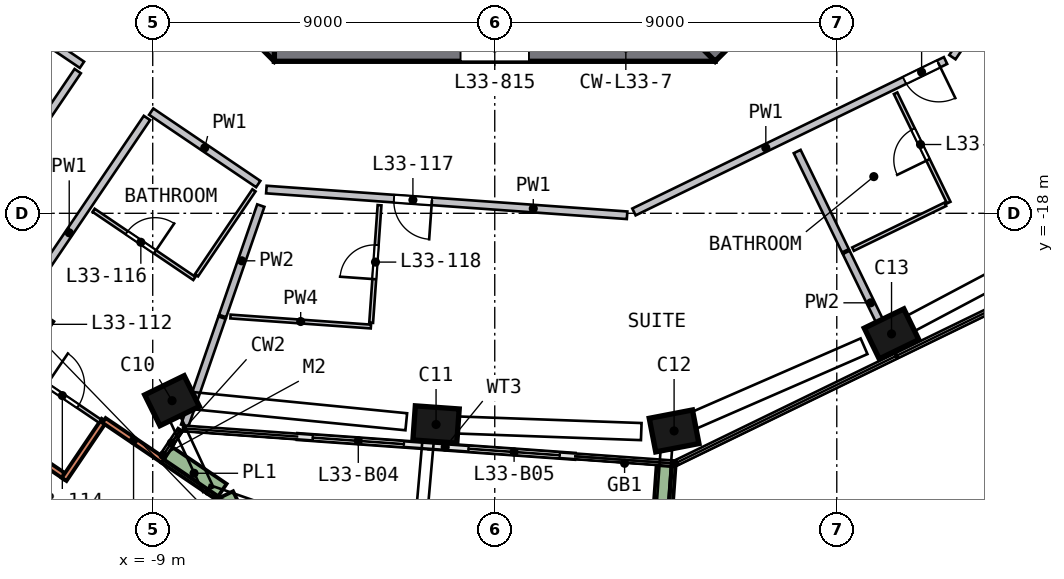
"""IFC4 building model, lengths in metres.
Left out: names, types, materials, properties, quantities, classifications, styles, units other than length and angle.
Written with IfcOpenShell. Run it as: python <this file> out.ifc"""

import sys

from ifc_helpers import new_model, si_unit, direction, frame, frame_2d, origin, origin_2d, place, context, subcontext, project, spatial, rectangle, extrude, element, fill, save


model = new_model("IFC4")
c1 = context("Model", 3, precision=1e-05, world=origin(), true_north=direction((0.0, 1.0)))
c2 = subcontext(c1, "Body", "Model", "MODEL_VIEW")
j1 = project(units=[si_unit("LENGTHUNIT", "METRE"), si_unit("PLANEANGLEUNIT", "RADIAN")], contexts=[c1])
p1 = place(None, origin())
s1 = spatial("IfcSite", under=j1, at=p1, CompositionType="ELEMENT")
p2 = place(p1, origin())
s2 = spatial("IfcBuilding", under=s1, at=p2, CompositionType="ELEMENT")
p3 = place(p2, frame((0.0, 0.0, 140.0)))
s3 = spatial("IfcBuildingStorey", under=s2, at=p3, CompositionType="ELEMENT", Elevation=140.0)
p4 = place(p3, frame((-8.623, -22.883, 0.0), z_axis=(0.109158074, -0.040060101, 0.993216846), x_axis=(-0.893388767, -0.442039795, 0.080357516)))
e1 = element("IfcColumn", 1, at=p4, inside=s3, PredefinedType="COLUMN", context=c2, shape_type="SweptSolid", body=[
    extrude(rectangle(XDim=1.15, YDim=0.9, at=origin_2d()), origin(), (0.0, 0.0, 1.0), 3.212),
])
p5 = place(p3, frame((-1.68, -23.549, 0.0), z_axis=(0.112098063, -0.006996623, 0.993672517), x_axis=(0.991182161, -0.070312823, -0.112312206)))
e2 = element("IfcColumn", 2, at=p5, inside=s3, PredefinedType="COLUMN", context=c2, shape_type="SweptSolid", body=[
    extrude(rectangle(XDim=1.15, YDim=0.9, at=origin_2d()), origin(), (0.0, 0.0, 1.0), 3.21),
])
p6 = place(p3, frame((4.583, -23.755, 0.0), z_axis=(0.112822514, 0.02273176, 0.993355096), x_axis=(-0.97541727, -0.187926686, 0.115085666)))
e3 = element("IfcColumn", 3, at=p6, inside=s3, PredefinedType="COLUMN", context=c2, shape_type="SweptSolid", body=[
    extrude(rectangle(XDim=1.15, YDim=0.9, at=origin_2d()), origin(), (0.0, 0.0, 1.0), 3.211),
])
p7 = place(p3, frame((10.32, -21.233, 0.0), z_axis=(0.100614614, 0.04988903, 0.993673882), x_axis=(0.893958315, 0.433851601, -0.11230013)))
e4 = element("IfcColumn", 4, at=p7, inside=s3, PredefinedType="COLUMN", context=c2, shape_type="SweptSolid", body=[
    extrude(rectangle(XDim=1.15, YDim=0.9, at=origin_2d()), origin(), (0.0, 0.0, 1.0), 3.21),
])
p8 = place(p3, frame((-12.392, -20.905, 0.0), z_axis=(0.099892281, -0.058156465, 0.993297215), x_axis=(-0.559990472, -0.828462229, 0.007810644)))
e5 = element("IfcColumn", 5, at=p8, inside=s3, PredefinedType="COLUMN", context=c2, shape_type="SweptSolid", body=[
    extrude(rectangle(XDim=0.9, YDim=0.9, at=origin_2d()), origin(), (0.0, 0.0, 1.0), 3.211),
])
p9 = place(p3, frame((-13.752, -5.552, 0.0), z_axis=(0.0, 0.0, 1.0), x_axis=(0.707106781, -0.707106781, 0.0)))
e6 = element("IfcWall", 6, at=p9, inside=s3, PredefinedType="SHEAR", context=c2, shape_type="SweptSolid", body=[
    extrude(rectangle(XDim=11.598, YDim=0.7, at=frame_2d((5.799, 0.0))), origin(), (0.0, 0.0, 1.0), 3.5),
])
p10 = place(p9, frame((2.099, 0.0, 0.0)))
e7 = element("IfcOpeningElement", 7, at=p10, cuts=e6, PredefinedType="OPENING", context=c2, shape_type="SweptSolid", body=[
    extrude(rectangle(XDim=1.2, YDim=2.1, at=frame_2d((0.6, 1.05))), frame((0.0, 0.36, 0.0), z_axis=(0.0, -1.0, 0.0), x_axis=(1.0, 0.0, 0.0)), (0.0, 0.0, 1.0), 0.72),
])
p11 = place(p3, frame((-5.799, -13.65, 0.0), z_axis=(0.0, 0.0, 1.0), x_axis=(1.0, 0.0, 0.0)))
e8 = element("IfcWall", 8, at=p11, inside=s3, PredefinedType="SHEAR", context=c2, shape_type="SweptSolid", body=[
    extrude(rectangle(XDim=11.598, YDim=0.7, at=frame_2d((5.799, 0.0))), origin(), (0.0, 0.0, 1.0), 3.5),
])
p12 = place(p11, frame((4.899, 0.0, 0.0)))
e9 = element("IfcOpeningElement", 9, at=p12, cuts=e8, PredefinedType="OPENING", context=c2, shape_type="SweptSolid", body=[
    extrude(rectangle(XDim=1.8, YDim=2.1, at=frame_2d((0.9, 1.05))), frame((0.0, 0.36, 0.0), z_axis=(0.0, -1.0, 0.0), x_axis=(1.0, 0.0, 0.0)), (0.0, 0.0, 1.0), 0.72),
])
p13 = place(p3, frame((5.552, -13.752, 0.0), z_axis=(0.0, 0.0, 1.0), x_axis=(0.707106781, 0.707106781, 0.0)))
e10 = element("IfcWall", 10, at=p13, inside=s3, PredefinedType="SHEAR", context=c2, shape_type="SweptSolid", body=[
    extrude(rectangle(XDim=11.598, YDim=0.7, at=frame_2d((5.799, 0.0))), origin(), (0.0, 0.0, 1.0), 3.5),
])
p14 = place(p13, frame((2.099, 0.0, 0.0)))
e11 = element("IfcOpeningElement", 11, at=p14, cuts=e10, PredefinedType="OPENING", context=c2, shape_type="SweptSolid", body=[
    extrude(rectangle(XDim=1.2, YDim=2.1, at=frame_2d((0.6, 1.05))), frame((0.0, 0.36, 0.0), z_axis=(0.0, -1.0, 0.0), x_axis=(1.0, 0.0, 0.0)), (0.0, 0.0, 1.0), 0.72),
])
p15 = place(p3, frame((-12.78, -23.932, 0.0), z_axis=(0.0, 0.0, 1.0), x_axis=(0.828296372, -0.56029021, 0.0)))
e12 = element("IfcWall", 12, at=p15, inside=s3, PredefinedType="SOLIDWALL", context=c2, shape_type="SweptSolid", body=[
    extrude(rectangle(XDim=1.8, YDim=0.15, at=frame_2d((0.9, 0.0))), origin(), (0.0, 0.0, 1.0), 3.19),
])
for number, where, z_axis, x_axis in (
    (13, (-11.332, -25.003, 0.0), (0.0, 0.0, 1.0), (0.56, 0.828, 0.0)),
    (14, (-10.281, -23.45, 0.0), (0.0, 0.0, 1.0), (0.828, -0.56, 0.0)),
):
    element("IfcWall", number, at=place(p3, frame(where, z_axis=z_axis, x_axis=x_axis)), inside=s3, PredefinedType="SOLIDWALL", context=c2, shape_type="SweptSolid", body=[
        extrude(rectangle(XDim=1.875, YDim=0.15, at=frame_2d((0.938, 0.0))), origin(), (0.0, 0.0, 1.0), 3.19),
    ])
p16 = place(p3, frame((-5.187, -23.875, 0.0), z_axis=(0.0, 0.0, 1.0), x_axis=(0.997464047, -0.071172155, 0.0)))
e15 = element("IfcWall", 15, at=p16, inside=s3, PredefinedType="SOLIDWALL", context=c2, shape_type="SweptSolid", body=[
    extrude(rectangle(XDim=3.475, YDim=0.15, at=frame_2d((1.737, 0.0))), origin(), (0.0, 0.0, 1.0), 2.475),
])
p17 = place(p16, frame((0.4, 0.0, 0.0)))
e16 = element("IfcOpeningElement", 16, at=p17, cuts=e15, PredefinedType="OPENING", context=c2, shape_type="SweptSolid", body=[
    extrude(rectangle(XDim=2.4, YDim=2.4, at=frame_2d((1.2, 1.2))), frame((0.0, 0.085, 0.0), z_axis=(0.0, -1.0, 0.0), x_axis=(1.0, 0.0, 0.0)), (0.0, 0.0, 1.0), 0.17),
])
p18 = place(p3, frame((-1.721, -24.122, 0.0), z_axis=(0.0, 0.0, 1.0), x_axis=(0.997464835, -0.071161106, 0.0)))
e17 = element("IfcWall", 17, at=p18, inside=s3, PredefinedType="SOLIDWALL", context=c2, shape_type="SweptSolid", body=[
    extrude(rectangle(XDim=3.836, YDim=0.15, at=frame_2d((1.918, 0.0))), origin(), (0.0, 0.0, 1.0), 2.475),
])
p19 = place(p18, frame((1.035, 0.0, 0.0)))
e18 = element("IfcOpeningElement", 18, at=p19, cuts=e17, PredefinedType="OPENING", context=c2, shape_type="SweptSolid", body=[
    extrude(rectangle(XDim=2.4, YDim=2.4, at=frame_2d((1.2, 1.2))), frame((0.0, 0.085, 0.0), z_axis=(0.0, -1.0, 0.0), x_axis=(1.0, 0.0, 0.0)), (0.0, 0.0, 1.0), 0.17),
])
p20 = place(p3, frame((-8.629, -24.356, 0.0), z_axis=(0.0, 0.0, 1.0), x_axis=(0.828277638, -0.560317905, 0.0)))
e19 = element("IfcWall", 19, at=p20, inside=s3, PredefinedType="SOLIDWALL", context=c2, shape_type="SweptSolid", body=[
    extrude(rectangle(XDim=1.731, YDim=0.5, at=frame_2d((0.866, 0.0))), origin(), (0.0, 0.0, 1.0), 0.7),
])
p21 = place(p3, frame((-7.11, -25.424, 0.0), z_axis=(0.0, 0.0, 1.0), x_axis=(0.437103717, -0.899411108, 0.0)))
e20 = element("IfcWall", 20, at=p21, inside=s3, PredefinedType="SOLIDWALL", context=c2, shape_type="SweptSolid", body=[
    extrude(rectangle(XDim=1.695, YDim=0.5, at=frame_2d((0.848, 0.0))), origin(), (0.0, 0.0, 1.0), 0.7),
])
p22 = place(p3, frame((4.316, -27.335, 0.0), z_axis=(0.0, 0.0, 1.0), x_axis=(0.071099196, 0.99746925, 0.0)))
e21 = element("IfcWall", 21, at=p22, inside=s3, PredefinedType="SOLIDWALL", context=c2, shape_type="SweptSolid", body=[
    extrude(rectangle(XDim=2.699, YDim=0.5, at=frame_2d((1.35, 0.0))), origin(), (0.0, 0.0, 1.0), 0.7),
])
p23 = place(p3, frame((-10.974, -14.258, 0.0), z_axis=(0.0, 0.0, 1.0), x_axis=(-0.56035998, -0.828249173, 0.0)))
e22 = element("IfcWall", 22, at=p23, inside=s3, PredefinedType="SOLIDWALL", context=c2, shape_type="SweptSolid", body=[
    extrude(rectangle(XDim=7.3, YDim=0.2, at=frame_2d((3.65, 0.0))), origin(), (0.0, 0.0, 1.0), 3.19),
])
p24 = place(p3, frame((-13.678, -12.187, 0.0), z_axis=(0.0, 0.0, 1.0), x_axis=(0.828263809, -0.560338347, 0.0)))
e23 = element("IfcWall", 23, at=p24, inside=s3, PredefinedType="SOLIDWALL", context=c2, shape_type="SweptSolid", body=[
    extrude(rectangle(XDim=3.4, YDim=0.2, at=frame_2d((1.7, 0.0))), origin(), (0.0, 0.0, 1.0), 3.19),
])
p25 = place(p3, frame((-13.242, -21.537, 0.0), z_axis=(0.0, 0.0, 1.0), x_axis=(0.56035998, 0.828249173, 0.0)))
e24 = element("IfcWall", 24, at=p25, inside=s3, PredefinedType="SOLIDWALL", context=c2, shape_type="SweptSolid", body=[
    extrude(rectangle(XDim=7.3, YDim=0.2, at=frame_2d((3.65, 0.0))), origin(), (0.0, 0.0, 1.0), 3.19),
])
p26 = place(p3, frame((-9.04, -15.325, 0.0), z_axis=(0.0, 0.0, 1.0), x_axis=(0.828253029, -0.560354281, 0.0)))
e25 = element("IfcWall", 25, at=p26, inside=s3, PredefinedType="SOLIDWALL", context=c2, shape_type="SweptSolid", body=[
    extrude(rectangle(XDim=3.4, YDim=0.2, at=frame_2d((1.7, 0.0))), origin(), (0.0, 0.0, 1.0), 3.19),
])
p27 = place(p3, frame((3.482, -18.052, 0.0), z_axis=(0.0, 0.0, 1.0), x_axis=(-0.997466118, 0.071143125, 0.0)))
e26 = element("IfcWall", 26, at=p27, inside=s3, PredefinedType="SOLIDWALL", context=c2, shape_type="SweptSolid", body=[
    extrude(rectangle(XDim=9.516, YDim=0.2, at=frame_2d((4.758, 0.0))), origin(), (0.0, 0.0, 1.0), 3.19),
])
p28 = place(p27, frame((5.15, 0.0, 0.0)))
e27 = element("IfcOpeningElement", 27, at=p28, cuts=e26, PredefinedType="OPENING", context=c2, shape_type="SweptSolid", body=[
    extrude(rectangle(XDim=1.0, YDim=2.1, at=frame_2d((0.5, 1.05))), frame((0.0, 0.11, 0.0), z_axis=(0.0, -1.0, 0.0), x_axis=(1.0, 0.0, 0.0)), (0.0, 0.0, 1.0), 0.22),
])
p29 = place(p3, frame((11.862, -13.98, 0.0), z_axis=(0.0, 0.0, 1.0), x_axis=(-0.899416115, -0.437093413, 0.0)))
e28 = element("IfcWall", 28, at=p29, inside=s3, PredefinedType="SOLIDWALL", context=c2, shape_type="SweptSolid", body=[
    extrude(rectangle(XDim=9.116, YDim=0.2, at=frame_2d((4.558, 0.0))), origin(), (0.0, 0.0, 1.0), 3.19),
])
p30 = place(p29, frame((0.2, 0.0, 0.0)))
e29 = element("IfcOpeningElement", 29, at=p30, cuts=e28, PredefinedType="OPENING", context=c2, shape_type="SweptSolid", body=[
    extrude(rectangle(XDim=1.0, YDim=2.1, at=frame_2d((0.5, 1.05))), frame((0.0, 0.11, 0.0), z_axis=(0.0, -1.0, 0.0), x_axis=(1.0, 0.0, 0.0)), (0.0, 0.0, 1.0), 0.22),
])
p31 = place(p3, frame((12.042, -13.892, 0.0), z_axis=(0.0, 0.0, 1.0), x_axis=(0.560341463, 0.828261701, 0.0)))
e30 = element("IfcWall", 30, at=p31, inside=s3, PredefinedType="SOLIDWALL", context=c2, shape_type="SweptSolid", body=[
    extrude(rectangle(XDim=9.516, YDim=0.2, at=frame_2d((4.758, 0.0))), origin(), (0.0, 0.0, 1.0), 3.19),
])
p32 = place(p3, frame((-7.176, -20.747, 0.0), z_axis=(0.0, 0.0, 1.0), x_axis=(-0.326885008, -0.94506412, 0.0)))
e31 = element("IfcWall", 31, at=p32, inside=s3, PredefinedType="SOLIDWALL", context=c2, shape_type="SweptSolid", body=[
    extrude(rectangle(XDim=3.011, YDim=0.2, at=frame_2d((1.506, 0.0))), origin(), (0.0, 0.0, 1.0), 3.19),
])
p33 = place(p3, frame((-6.156, -17.797, 0.0), z_axis=(0.0, 0.0, 1.0), x_axis=(-0.326832369, -0.945082326, 0.0)))
e32 = element("IfcWall", 32, at=p33, inside=s3, PredefinedType="SOLIDWALL", context=c2, shape_type="SweptSolid", body=[
    extrude(rectangle(XDim=3.075, YDim=0.2, at=frame_2d((1.537, 0.0))), origin(), (0.0, 0.0, 1.0), 3.19),
])
p34 = place(p3, frame((7.958, -16.374, 0.0), z_axis=(0.0, 0.0, 1.0), x_axis=(0.437133221, -0.899396769, 0.0)))
e33 = element("IfcWall", 33, at=p34, inside=s3, PredefinedType="SOLIDWALL", context=c2, shape_type="SweptSolid", body=[
    extrude(rectangle(XDim=2.905, YDim=0.2, at=frame_2d((1.452, 0.0))), origin(), (0.0, 0.0, 1.0), 3.19),
])
p35 = place(p3, frame((9.248, -19.028, 0.0), z_axis=(0.0, 0.0, 1.0), x_axis=(0.437095146, -0.899415273, 0.0)))
e34 = element("IfcWall", 34, at=p35, inside=s3, PredefinedType="SOLIDWALL", context=c2, shape_type="SweptSolid", body=[
    extrude(rectangle(XDim=2.952, YDim=0.2, at=frame_2d((1.476, 0.0))), origin(), (0.0, 0.0, 1.0), 3.19),
])
p36 = place(p3, frame((-13.077, -21.649, 0.0), z_axis=(0.0, 0.0, 1.0), x_axis=(0.828231151, -0.560386617, 0.0)))
e35 = element("IfcWall", 35, at=p36, inside=s3, PredefinedType="PARTITIONING", context=c2, shape_type="SweptSolid", body=[
    extrude(rectangle(XDim=3.252, YDim=0.1, at=frame_2d((1.626, 0.0))), origin(), (0.0, 0.0, 1.0), 3.19),
])
p37 = place(p36, frame((1.55, 0.0, 0.0)))
e36 = element("IfcOpeningElement", 36, at=p37, cuts=e35, PredefinedType="OPENING", context=c2, shape_type="SweptSolid", body=[
    extrude(rectangle(XDim=1.0, YDim=2.1, at=frame_2d((0.5, 1.05))), frame((0.0, 0.06, 0.0), z_axis=(0.0, -1.0, 0.0), x_axis=(1.0, 0.0, 0.0)), (0.0, 0.0, 1.0), 0.12),
])
p38 = place(p3, frame((-10.555, -17.922, 0.0), z_axis=(0.0, 0.0, 1.0), x_axis=(0.828239672, -0.560374023, 0.0)))
e37 = element("IfcWall", 37, at=p38, inside=s3, PredefinedType="PARTITIONING", context=c2, shape_type="SweptSolid", body=[
    extrude(rectangle(XDim=3.2, YDim=0.1, at=frame_2d((1.6, 0.0))), origin(), (0.0, 0.0, 1.0), 3.19),
])
p39 = place(p38, frame((1.05, 0.0, 0.0)))
e38 = element("IfcOpeningElement", 38, at=p39, cuts=e37, PredefinedType="OPENING", context=c2, shape_type="SweptSolid", body=[
    extrude(rectangle(XDim=0.9, YDim=2.1, at=frame_2d((0.45, 1.05))), frame((0.0, 0.06, 0.0), z_axis=(0.0, -1.0, 0.0), x_axis=(1.0, 0.0, 0.0)), (0.0, 0.0, 1.0), 0.12),
])
p40 = place(p3, frame((-7.849, -19.632, 0.0), z_axis=(0.0, 0.0, 1.0), x_axis=(0.560342209, 0.828261196, 0.0)))
e39 = element("IfcWall", 39, at=p40, inside=s3, PredefinedType="PARTITIONING", context=c2, shape_type="SweptSolid", body=[
    extrude(rectangle(XDim=2.7, YDim=0.1, at=frame_2d((1.35, 0.0))), origin(), (0.0, 0.0, 1.0), 3.19),
])
p41 = place(p3, frame((-3.259, -20.979, 0.0), z_axis=(0.0, 0.0, 1.0), x_axis=(-0.997467726, 0.071120576, 0.0)))
e40 = element("IfcWall", 40, at=p41, inside=s3, PredefinedType="PARTITIONING", context=c2, shape_type="SweptSolid", body=[
    extrude(rectangle(XDim=3.704, YDim=0.1, at=frame_2d((1.852, 0.0))), origin(), (0.0, 0.0, 1.0), 3.19),
])
p42 = place(p3, frame((-3.252, -20.88, 0.0), z_axis=(0.0, 0.0, 1.0), x_axis=(0.071191085, 0.997462696, 0.0)))
e41 = element("IfcWall", 41, at=p42, inside=s3, PredefinedType="PARTITIONING", context=c2, shape_type="SweptSolid", body=[
    extrude(rectangle(XDim=3.1, YDim=0.1, at=frame_2d((1.55, 0.0))), origin(), (0.0, 0.0, 1.0), 3.19),
])
p43 = place(p42, frame((1.15, 0.0, 0.0)))
e42 = element("IfcOpeningElement", 42, at=p43, cuts=e41, PredefinedType="OPENING", context=c2, shape_type="SweptSolid", body=[
    extrude(rectangle(XDim=0.9, YDim=2.1, at=frame_2d((0.45, 1.05))), frame((0.0, 0.06, 0.0), z_axis=(0.0, -1.0, 0.0), x_axis=(1.0, 0.0, 0.0)), (0.0, 0.0, 1.0), 0.12),
])
p44 = place(p3, frame((11.857, -17.762, 0.0), z_axis=(0.0, 0.0, 1.0), x_axis=(-0.899415747, -0.437094171, 0.0)))
e43 = element("IfcWall", 43, at=p44, inside=s3, PredefinedType="PARTITIONING", context=c2, shape_type="SweptSolid", body=[
    extrude(rectangle(XDim=2.7, YDim=0.1, at=frame_2d((1.35, 0.0))), origin(), (0.0, 0.0, 1.0), 3.19),
])
p45 = place(p3, frame((11.947, -17.719, 0.0), z_axis=(0.0, 0.0, 1.0), x_axis=(-0.437175564, 0.899376187, 0.0)))
e44 = element("IfcWall", 44, at=p45, inside=s3, PredefinedType="PARTITIONING", context=c2, shape_type="SweptSolid", body=[
    extrude(rectangle(XDim=3.2, YDim=0.1, at=frame_2d((1.6, 0.0))), origin(), (0.0, 0.0, 1.0), 3.19),
])
p46 = place(p45, frame((1.25, 0.0, 0.0)))
e45 = element("IfcOpeningElement", 45, at=p46, cuts=e44, PredefinedType="OPENING", context=c2, shape_type="SweptSolid", body=[
    extrude(rectangle(XDim=0.9, YDim=2.1, at=frame_2d((0.45, 1.05))), frame((0.0, 0.06, 0.0), z_axis=(0.0, -1.0, 0.0), x_axis=(1.0, 0.0, 0.0)), (0.0, 0.0, 1.0), 0.12),
])
p47 = place(p17, origin())
e46 = element("IfcDoor", 46, at=p47, inside=s3, OperationType="SLIDING_TO_RIGHT", PredefinedType="DOOR", context=c2, shape_type="SweptSolid", body=[
    extrude(rectangle(XDim=2.4, YDim=2.4, at=frame_2d((1.2, 1.2))), frame((0.0, 0.025, 0.0), z_axis=(0.0, -1.0, 0.0), x_axis=(1.0, 0.0, 0.0)), (0.0, 0.0, 1.0), 0.05),
])
fill(e16, e46)
p48 = place(p19, origin())
e47 = element("IfcDoor", 47, at=p48, inside=s3, OperationType="SLIDING_TO_LEFT", PredefinedType="DOOR", context=c2, shape_type="SweptSolid", body=[
    extrude(rectangle(XDim=2.4, YDim=2.4, at=frame_2d((1.2, 1.2))), frame((0.0, 0.025, 0.0), z_axis=(0.0, -1.0, 0.0), x_axis=(1.0, 0.0, 0.0)), (0.0, 0.0, 1.0), 0.05),
])
fill(e18, e47)
p49 = place(p37, origin())
e48 = element("IfcDoor", 48, at=p49, inside=s3, OperationType="SINGLE_SWING_LEFT", PredefinedType="DOOR", context=c2, shape_type="SweptSolid", body=[
    extrude(rectangle(XDim=1.0, YDim=2.1, at=frame_2d((0.5, 1.05))), frame((0.0, 0.025, 0.0), z_axis=(0.0, -1.0, 0.0), x_axis=(1.0, 0.0, 0.0)), (0.0, 0.0, 1.0), 0.05),
])
fill(e36, e48)
p50 = place(p39, origin())
e49 = element("IfcDoor", 49, at=p50, inside=s3, OperationType="SINGLE_SWING_RIGHT", PredefinedType="DOOR", context=c2, shape_type="SweptSolid", body=[
    extrude(rectangle(XDim=0.9, YDim=2.1, at=frame_2d((0.45, 1.05))), frame((0.0, 0.025, 0.0), z_axis=(0.0, -1.0, 0.0), x_axis=(1.0, 0.0, 0.0)), (0.0, 0.0, 1.0), 0.05),
])
fill(e38, e49)
p51 = place(p28, origin())
e50 = element("IfcDoor", 50, at=p51, inside=s3, OperationType="SINGLE_SWING_LEFT", PredefinedType="DOOR", context=c2, shape_type="SweptSolid", body=[
    extrude(rectangle(XDim=1.0, YDim=2.1, at=frame_2d((0.5, 1.05))), frame((0.0, 0.025, 0.0), z_axis=(0.0, -1.0, 0.0), x_axis=(1.0, 0.0, 0.0)), (0.0, 0.0, 1.0), 0.05),
])
fill(e27, e50)
p52 = place(p43, origin())
e51 = element("IfcDoor", 51, at=p52, inside=s3, OperationType="SINGLE_SWING_LEFT", PredefinedType="DOOR", context=c2, shape_type="SweptSolid", body=[
    extrude(rectangle(XDim=0.9, YDim=2.1, at=frame_2d((0.45, 1.05))), frame((0.0, 0.025, 0.0), z_axis=(0.0, -1.0, 0.0), x_axis=(1.0, 0.0, 0.0)), (0.0, 0.0, 1.0), 0.05),
])
fill(e42, e51)
p53 = place(p30, origin())
e52 = element("IfcDoor", 52, at=p53, inside=s3, OperationType="SINGLE_SWING_LEFT", PredefinedType="DOOR", context=c2, shape_type="SweptSolid", body=[
    extrude(rectangle(XDim=1.0, YDim=2.1, at=frame_2d((0.5, 1.05))), frame((0.0, 0.025, 0.0), z_axis=(0.0, -1.0, 0.0), x_axis=(1.0, 0.0, 0.0)), (0.0, 0.0, 1.0), 0.05),
])
fill(e29, e52)
p54 = place(p46, origin())
e53 = element("IfcDoor", 53, at=p54, inside=s3, OperationType="SINGLE_SWING_LEFT", PredefinedType="DOOR", context=c2, shape_type="SweptSolid", body=[
    extrude(rectangle(XDim=0.9, YDim=2.1, at=frame_2d((0.45, 1.05))), frame((0.0, 0.025, 0.0), z_axis=(0.0, -1.0, 0.0), x_axis=(1.0, 0.0, 0.0)), (0.0, 0.0, 1.0), 0.05),
])
fill(e45, e53)
save(model, sys.argv[1])
